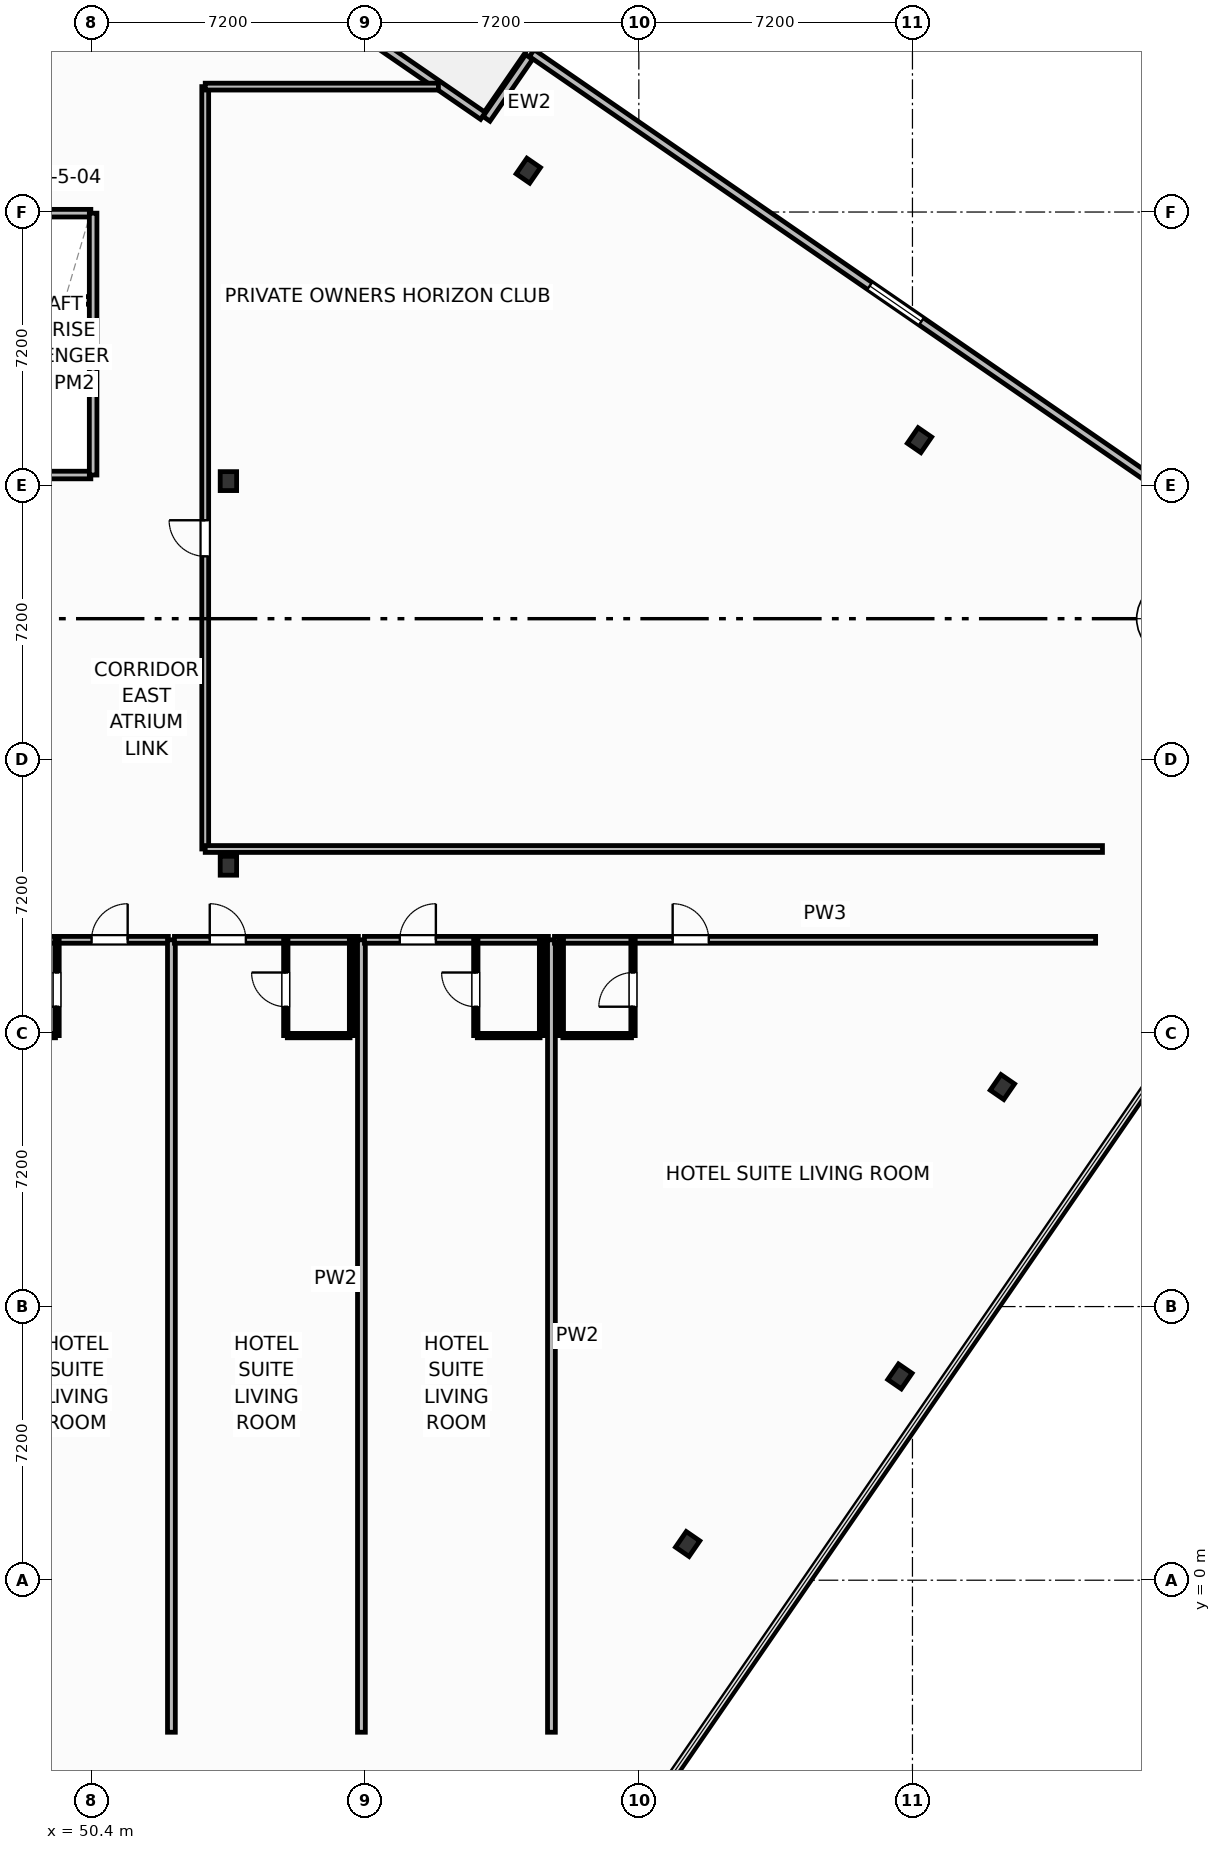
"""IFC4 building model, lengths in metres.
Left out: names, types, materials, properties, quantities, classifications, styles, units other than length and angle.
Written with IfcOpenShell. Run it as: python <this file> out.ifc"""

import sys

from ifc_helpers import new_model, si_unit, direction, frame, frame_2d, origin, origin_2d, place, context, subcontext, project, spatial, rectangle, i_section, extrude, element, fill, save


model = new_model("IFC4")
c1 = context("Model", 3, precision=1e-05, world=origin(), true_north=direction((0.0, 1.0)))
c2 = subcontext(c1, "Body", "Model", "MODEL_VIEW")
j1 = project(units=[si_unit("LENGTHUNIT", "METRE"), si_unit("PLANEANGLEUNIT", "RADIAN")], contexts=[c1])
p1 = place(None, origin())
s1 = spatial("IfcSite", under=j1, at=p1, CompositionType="ELEMENT")
p2 = place(p1, origin())
s2 = spatial("IfcBuilding", under=s1, at=p2, CompositionType="ELEMENT")
p3 = place(p2, frame((0.0, 0.0, 30.7)))
s3 = spatial("IfcBuildingStorey", under=s2, at=p3, CompositionType="ELEMENT", Elevation=30.7)
for number, where, z_axis, x_axis in (
    (1, (54.0, 18.8, 0.0), (0.0, 0.0, 1.0), (1.0, 0.0, 0.0)),
    (2, (54.0, 28.92, 0.0), (0.0, 0.0, 1.0), (1.0, 0.0, 0.0)),
    (3, (66.085, 0.953, 0.0), (0.0, 0.0, 1.0), (0.824, -0.567, 0.0)),
    (4, (71.67, 5.363, 0.0), (0.0, 0.0, 1.0), (0.824, -0.567, 0.0)),
    (5, (74.367, 12.976, 0.0), (0.0, 0.0, 1.0), (0.824, -0.567, 0.0)),
    (6, (72.186, 29.997, 0.0), (0.0, 0.0, 1.0), (0.824, -0.567, 0.0)),
    (7, (61.891, 37.088, 0.0), (0.0, 0.0, 1.0), (0.824, -0.567, 0.0)),
):
    element("IfcColumn", number, at=place(p3, frame(where, z_axis=z_axis, x_axis=x_axis)), inside=s3, PredefinedType="COLUMN", context=c2, shape_type="SweptSolid", body=[
        extrude(i_section(OverallWidth=0.432, OverallDepth=0.498, WebThickness=0.056, FlangeThickness=0.089, FilletRadius=0.025, at=origin_2d()), origin(), (0.0, 0.0, 1.0), 3.7),
    ])
p4 = place(p3, frame((55.757, 41.933, 0.0), z_axis=(0.0, 0.0, 1.0), x_axis=(0.823534636215, -0.567265989598, 0.0)))
e8 = element("IfcWall", 8, at=p4, inside=s3, PredefinedType="SOLIDWALL", context=c2, shape_type="SweptSolid", body=[
    extrude(rectangle(XDim=6.0, YDim=0.22, at=frame_2d((3.0, 0.0))), origin(), (0.0, 0.0, 1.0), 2.73),
])
p5 = place(p4, frame((0.4, 0.0, 0.0)))
e9 = element("IfcOpeningElement", 9, at=p5, cuts=e8, PredefinedType="OPENING", context=c2, shape_type="SweptSolid", body=[
    extrude(rectangle(XDim=1.5, YDim=2.25, at=frame_2d((0.75, 1.125))), frame((0.0, 0.12, 0.0), z_axis=(0.0, -1.0, 0.0), x_axis=(1.0, 0.0, 0.0)), (0.0, 0.0, 1.0), 0.24),
])
p6 = place(p3, frame((33.518, -1.362, 0.0), z_axis=(0.0, 0.0, 1.0), x_axis=(0.82353935489, -0.567259139148, 0.0)))
e10 = element("IfcWall", 10, at=p6, inside=s3, PredefinedType="SOLIDWALL", context=c2, shape_type="SweptSolid", body=[
    extrude(rectangle(XDim=23.147, YDim=0.22, at=frame_2d((11.573, 0.0))), origin(), (0.0, 0.0, 1.0), 2.73),
])
p7 = place(p6, frame((10.749, 0.0, 0.8)))
e11 = element("IfcOpeningElement", 11, at=p7, cuts=e10, PredefinedType="OPENING", context=c2, shape_type="SweptSolid", body=[
    extrude(rectangle(XDim=1.65, YDim=1.65, at=frame_2d((0.825, 0.825))), frame((0.0, 0.12, 0.0), z_axis=(0.0, -1.0, 0.0), x_axis=(1.0, 0.0, 0.0)), (0.0, 0.0, 1.0), 0.24),
])
p8 = place(p3, frame((81.127, 26.995, 0.0), z_axis=(0.0, 0.0, 1.0), x_axis=(-0.823530169317, 0.567272474411, 0.0)))
e12 = element("IfcWall", 12, at=p8, inside=s3, PredefinedType="SOLIDWALL", context=c2, shape_type="SweptSolid", body=[
    extrude(rectangle(XDim=23.247, YDim=0.22, at=frame_2d((11.624, 0.0))), origin(), (0.0, 0.0, 1.0), 2.73),
])
p9 = place(p8, frame((10.799, 0.0, 0.8)))
e13 = element("IfcOpeningElement", 13, at=p9, cuts=e12, PredefinedType="OPENING", context=c2, shape_type="SweptSolid", body=[
    extrude(rectangle(XDim=1.65, YDim=1.65, at=frame_2d((0.825, 0.825))), frame((0.0, 0.12, 0.0), z_axis=(0.0, -1.0, 0.0), x_axis=(1.0, 0.0, 0.0)), (0.0, 0.0, 1.0), 0.24),
])
p10 = place(p3, frame((61.912, 40.079, 0.0), z_axis=(0.0, 0.0, 1.0), x_axis=(-0.567189720735, -0.82358716642, 0.0)))
e14 = element("IfcWall", 14, at=p10, inside=s3, PredefinedType="SOLIDWALL", context=c2, shape_type="SweptSolid", body=[
    extrude(rectangle(XDim=1.975, YDim=0.22, at=frame_2d((0.987, 0.0))), origin(), (0.0, 0.0, 1.0), 2.73),
])
p11 = place(p3, frame((47.58, 16.85, 0.0), z_axis=(0.0, 0.0, 1.0), x_axis=(1.0, 0.0, 0.0)))
e15 = element("IfcWall", 15, at=p11, inside=s3, PredefinedType="PARTITIONING", context=c2, shape_type="SweptSolid", body=[
    extrude(rectangle(XDim=4.84, YDim=0.18, at=frame_2d((2.42, 0.0))), origin(), (0.0, 0.0, 1.0), 3.45),
])
p12 = place(p11, frame((2.819, 0.0, 0.0)))
e16 = element("IfcOpeningElement", 16, at=p12, cuts=e15, PredefinedType="OPENING", context=c2, shape_type="SweptSolid", body=[
    extrude(rectangle(XDim=0.95, YDim=2.15, at=frame_2d((0.475, 1.075))), frame((0.0, 0.1, 0.0), z_axis=(0.0, -1.0, 0.0), x_axis=(1.0, 0.0, 0.0)), (0.0, 0.0, 1.0), 0.2),
])
p13 = place(p3, frame((47.8, 14.33, 0.0), z_axis=(0.0, 0.0, 1.0), x_axis=(1.0, 0.0, 0.0)))
e17 = element("IfcWall", 17, at=p13, inside=s3, PredefinedType="PARTITIONING", context=c2, shape_type="SweptSolid", body=[
    extrude(rectangle(XDim=1.65, YDim=0.115, at=frame_2d((0.825, 0.0))), origin(), (0.0, 0.0, 1.0), 3.45),
])
p14 = place(p3, frame((49.49, 14.33, 0.0), z_axis=(0.0, 0.0, 1.0), x_axis=(0.0, 1.0, 0.0)))
e18 = element("IfcWall", 18, at=p14, inside=s3, PredefinedType="PARTITIONING", context=c2, shape_type="SweptSolid", body=[
    extrude(rectangle(XDim=2.52, YDim=0.115, at=frame_2d((1.26, 0.0))), origin(), (0.0, 0.0, 1.0), 3.45),
])
p15 = place(p14, frame((0.76, 0.0, 0.0)))
e19 = element("IfcOpeningElement", 19, at=p15, cuts=e18, PredefinedType="OPENING", context=c2, shape_type="SweptSolid", body=[
    extrude(rectangle(XDim=0.9, YDim=2.05, at=frame_2d((0.45, 1.025))), frame((0.0, 0.067, 0.0), z_axis=(0.0, -1.0, 0.0), x_axis=(1.0, 0.0, 0.0)), (0.0, 0.0, 1.0), 0.135),
])
p16 = place(p3, frame((52.5, -4.0, 0.0), z_axis=(0.0, 0.0, 1.0), x_axis=(0.0, 1.0, 0.0)))
e20 = element("IfcWall", 20, at=p16, inside=s3, PredefinedType="PARTITIONING", context=c2, shape_type="SweptSolid", body=[
    extrude(rectangle(XDim=20.85, YDim=0.205, at=frame_2d((10.425, 0.0))), origin(), (0.0, 0.0, 1.0), 3.45),
])
p17 = place(p3, frame((52.58, 16.85, 0.0), z_axis=(0.0, 0.0, 1.0), x_axis=(1.0, 0.0, 0.0)))
e21 = element("IfcWall", 21, at=p17, inside=s3, PredefinedType="PARTITIONING", context=c2, shape_type="SweptSolid", body=[
    extrude(rectangle(XDim=4.84, YDim=0.18, at=frame_2d((2.42, 0.0))), origin(), (0.0, 0.0, 1.0), 3.45),
])
p18 = place(p17, frame((0.929, 0.0, 0.0)))
e22 = element("IfcOpeningElement", 22, at=p18, cuts=e21, PredefinedType="OPENING", context=c2, shape_type="SweptSolid", body=[
    extrude(rectangle(XDim=0.95, YDim=2.15, at=frame_2d((0.475, 1.075))), frame((0.0, 0.1, 0.0), z_axis=(0.0, -1.0, 0.0), x_axis=(1.0, 0.0, 0.0)), (0.0, 0.0, 1.0), 0.2),
])
p19 = place(p3, frame((55.55, 14.33, 0.0), z_axis=(0.0, 0.0, 1.0), x_axis=(1.0, 0.0, 0.0)))
e23 = element("IfcWall", 23, at=p19, inside=s3, PredefinedType="PARTITIONING", context=c2, shape_type="SweptSolid", body=[
    extrude(rectangle(XDim=1.65, YDim=0.115, at=frame_2d((0.825, 0.0))), origin(), (0.0, 0.0, 1.0), 3.45),
])
p20 = place(p3, frame((55.51, 14.33, 0.0), z_axis=(0.0, 0.0, 1.0), x_axis=(0.0, 1.0, 0.0)))
e24 = element("IfcWall", 24, at=p20, inside=s3, PredefinedType="PARTITIONING", context=c2, shape_type="SweptSolid", body=[
    extrude(rectangle(XDim=2.52, YDim=0.115, at=frame_2d((1.26, 0.0))), origin(), (0.0, 0.0, 1.0), 3.45),
])
p21 = place(p20, frame((0.76, 0.0, 0.0)))
e25 = element("IfcOpeningElement", 25, at=p21, cuts=e24, PredefinedType="OPENING", context=c2, shape_type="SweptSolid", body=[
    extrude(rectangle(XDim=0.9, YDim=2.05, at=frame_2d((0.45, 1.025))), frame((0.0, 0.067, 0.0), z_axis=(0.0, -1.0, 0.0), x_axis=(1.0, 0.0, 0.0)), (0.0, 0.0, 1.0), 0.135),
])
p22 = place(p3, frame((57.24, 14.33, 0.0), z_axis=(0.0, 0.0, 1.0), x_axis=(0.0, 1.0, 0.0)))
e26 = element("IfcWall", 26, at=p22, inside=s3, PredefinedType="PARTITIONING", context=c2, shape_type="SweptSolid", body=[
    extrude(rectangle(XDim=2.52, YDim=0.115, at=frame_2d((1.26, 0.0))), origin(), (0.0, 0.0, 1.0), 3.45),
])
p23 = place(p3, frame((57.5, -4.0, 0.0), z_axis=(0.0, 0.0, 1.0), x_axis=(0.0, 1.0, 0.0)))
e27 = element("IfcWall", 27, at=p23, inside=s3, PredefinedType="PARTITIONING", context=c2, shape_type="SweptSolid", body=[
    extrude(rectangle(XDim=20.85, YDim=0.205, at=frame_2d((10.425, 0.0))), origin(), (0.0, 0.0, 1.0), 3.45),
])
p24 = place(p3, frame((57.58, 16.85, 0.0), z_axis=(0.0, 0.0, 1.0), x_axis=(1.0, 0.0, 0.0)))
e28 = element("IfcWall", 28, at=p24, inside=s3, PredefinedType="PARTITIONING", context=c2, shape_type="SweptSolid", body=[
    extrude(rectangle(XDim=4.84, YDim=0.18, at=frame_2d((2.42, 0.0))), origin(), (0.0, 0.0, 1.0), 2.58),
])
p25 = place(p24, frame((0.929, 0.0, 0.0)))
e29 = element("IfcOpeningElement", 29, at=p25, cuts=e28, PredefinedType="OPENING", context=c2, shape_type="SweptSolid", body=[
    extrude(rectangle(XDim=0.95, YDim=2.15, at=frame_2d((0.475, 1.075))), frame((0.0, 0.1, 0.0), z_axis=(0.0, -1.0, 0.0), x_axis=(1.0, 0.0, 0.0)), (0.0, 0.0, 1.0), 0.2),
])
p26 = place(p3, frame((60.55, 14.33, 0.0), z_axis=(0.0, 0.0, 1.0), x_axis=(1.0, 0.0, 0.0)))
e30 = element("IfcWall", 30, at=p26, inside=s3, PredefinedType="PARTITIONING", context=c2, shape_type="SweptSolid", body=[
    extrude(rectangle(XDim=1.65, YDim=0.115, at=frame_2d((0.825, 0.0))), origin(), (0.0, 0.0, 1.0), 3.45),
])
p27 = place(p3, frame((60.51, 14.33, 0.0), z_axis=(0.0, 0.0, 1.0), x_axis=(0.0, 1.0, 0.0)))
e31 = element("IfcWall", 31, at=p27, inside=s3, PredefinedType="PARTITIONING", context=c2, shape_type="SweptSolid", body=[
    extrude(rectangle(XDim=2.52, YDim=0.115, at=frame_2d((1.26, 0.0))), origin(), (0.0, 0.0, 1.0), 3.45),
])
p28 = place(p27, frame((0.76, 0.0, 0.0)))
e32 = element("IfcOpeningElement", 32, at=p28, cuts=e31, PredefinedType="OPENING", context=c2, shape_type="SweptSolid", body=[
    extrude(rectangle(XDim=0.9, YDim=2.05, at=frame_2d((0.45, 1.025))), frame((0.0, 0.067, 0.0), z_axis=(0.0, -1.0, 0.0), x_axis=(1.0, 0.0, 0.0)), (0.0, 0.0, 1.0), 0.135),
])
p29 = place(p3, frame((62.24, 14.33, 0.0), z_axis=(0.0, 0.0, 1.0), x_axis=(0.0, 1.0, 0.0)))
e33 = element("IfcWall", 33, at=p29, inside=s3, PredefinedType="PARTITIONING", context=c2, shape_type="SweptSolid", body=[
    extrude(rectangle(XDim=2.52, YDim=0.115, at=frame_2d((1.26, 0.0))), origin(), (0.0, 0.0, 1.0), 3.45),
])
p30 = place(p3, frame((62.5, -4.0, 0.0), z_axis=(0.0, 0.0, 1.0), x_axis=(0.0, 1.0, 0.0)))
e34 = element("IfcWall", 34, at=p30, inside=s3, PredefinedType="PARTITIONING", context=c2, shape_type="SweptSolid", body=[
    extrude(rectangle(XDim=20.85, YDim=0.205, at=frame_2d((10.425, 0.0))), origin(), (0.0, 0.0, 1.0), 3.45),
])
p31 = place(p3, frame((62.58, 16.85, 0.0), z_axis=(0.0, 0.0, 1.0), x_axis=(1.0, 0.0, 0.0)))
e35 = element("IfcWall", 35, at=p31, inside=s3, PredefinedType="PARTITIONING", context=c2, shape_type="SweptSolid", body=[
    extrude(rectangle(XDim=14.24, YDim=0.18, at=frame_2d((7.12, 0.0))), origin(), (0.0, 0.0, 1.0), 3.45),
])
p32 = place(p31, frame((3.11, 0.0, 0.0)))
e36 = element("IfcOpeningElement", 36, at=p32, cuts=e35, PredefinedType="OPENING", context=c2, shape_type="SweptSolid", body=[
    extrude(rectangle(XDim=0.95, YDim=2.15, at=frame_2d((0.475, 1.075))), frame((0.0, 0.1, 0.0), z_axis=(0.0, -1.0, 0.0), x_axis=(1.0, 0.0, 0.0)), (0.0, 0.0, 1.0), 0.2),
])
p33 = place(p3, frame((62.8, 14.33, 0.0), z_axis=(0.0, 0.0, 1.0), x_axis=(1.0, 0.0, 0.0)))
e37 = element("IfcWall", 37, at=p33, inside=s3, PredefinedType="PARTITIONING", context=c2, shape_type="SweptSolid", body=[
    extrude(rectangle(XDim=1.807, YDim=0.115, at=frame_2d((0.904, 0.0))), origin(), (0.0, 0.0, 1.0), 3.45),
])
p34 = place(p3, frame((64.647, 14.33, 0.0), z_axis=(0.0, 0.0, 1.0), x_axis=(0.0, 1.0, 0.0)))
e38 = element("IfcWall", 38, at=p34, inside=s3, PredefinedType="PARTITIONING", context=c2, shape_type="SweptSolid", body=[
    extrude(rectangle(XDim=2.52, YDim=0.115, at=frame_2d((1.26, 0.0))), origin(), (0.0, 0.0, 1.0), 3.45),
])
p35 = place(p34, frame((0.76, 0.0, 0.0)))
e39 = element("IfcOpeningElement", 39, at=p35, cuts=e38, PredefinedType="OPENING", context=c2, shape_type="SweptSolid", body=[
    extrude(rectangle(XDim=0.9, YDim=2.05, at=frame_2d((0.45, 1.025))), frame((0.0, 0.067, 0.0), z_axis=(0.0, -1.0, 0.0), x_axis=(1.0, 0.0, 0.0)), (0.0, 0.0, 1.0), 0.135),
])
p36 = place(p3, frame((62.76, 14.33, 0.0), z_axis=(0.0, 0.0, 1.0), x_axis=(0.0, 1.0, 0.0)))
e40 = element("IfcWall", 40, at=p36, inside=s3, PredefinedType="PARTITIONING", context=c2, shape_type="SweptSolid", body=[
    extrude(rectangle(XDim=2.52, YDim=0.115, at=frame_2d((1.26, 0.0))), origin(), (0.0, 0.0, 1.0), 3.45),
])
p37 = place(p3, frame((53.39, 19.24, 0.0), z_axis=(0.0, 0.0, 1.0), x_axis=(0.0, 1.0, 0.0)))
e41 = element("IfcWall", 41, at=p37, inside=s3, PredefinedType="PARTITIONING", context=c2, shape_type="SweptSolid", body=[
    extrude(rectangle(XDim=20.06, YDim=0.18, at=frame_2d((10.03, 0.0))), origin(), (0.0, 0.0, 1.0), 3.45),
])
p38 = place(p37, frame((7.7, 0.0, 0.0)))
e42 = element("IfcOpeningElement", 42, at=p38, cuts=e41, PredefinedType="OPENING", context=c2, shape_type="SweptSolid", body=[
    extrude(rectangle(XDim=0.95, YDim=2.05, at=frame_2d((0.475, 1.025))), frame((0.0, 0.1, 0.0), z_axis=(0.0, -1.0, 0.0), x_axis=(1.0, 0.0, 0.0)), (0.0, 0.0, 1.0), 0.2),
])
p39 = place(p3, frame((53.39, 19.24, 0.0), z_axis=(0.0, 0.0, 1.0), x_axis=(1.0, 0.0, 0.0)))
e43 = element("IfcWall", 43, at=p39, inside=s3, PredefinedType="PARTITIONING", context=c2, shape_type="SweptSolid", body=[
    extrude(rectangle(XDim=23.61, YDim=0.18, at=frame_2d((11.805, 0.0))), origin(), (0.0, 0.0, 1.0), 3.45),
])
p40 = place(p3, frame((53.39, 39.3, 0.0), z_axis=(0.0, 0.0, 1.0), x_axis=(1.0, 0.0, 0.0)))
e44 = element("IfcWall", 44, at=p40, inside=s3, PredefinedType="PARTITIONING", context=c2, shape_type="SweptSolid", body=[
    extrude(rectangle(XDim=6.136, YDim=0.18, at=frame_2d((3.068, 0.0))), origin(), (0.0, 0.0, 1.0), 3.45),
])
for number, where, z_axis, x_axis in (
    (45, (48.32, 31.375, 0.0), (0.0, 0.0, 1.0), (1.0, 0.0, 0.0)),
    (46, (48.32, 33.675, 0.0), (0.0, 0.0, 1.0), (1.0, 0.0, 0.0)),
):
    element("IfcWall", number, at=place(p3, frame(where, z_axis=z_axis, x_axis=x_axis)), inside=s3, PredefinedType="PARTITIONING", context=c2, shape_type="SweptSolid", body=[
        extrude(rectangle(XDim=2.06, YDim=0.2, at=frame_2d((1.03, 0.0))), origin(), (0.0, 0.0, 1.0), 3.45),
    ])
p41 = place(p3, frame((48.32, 29.08, 0.0), z_axis=(0.0, 0.0, 1.0), x_axis=(1.0, 0.0, 0.0)))
e47 = element("IfcWall", 47, at=p41, inside=s3, PredefinedType="PARTITIONING", context=c2, shape_type="SweptSolid", body=[
    extrude(rectangle(XDim=2.06, YDim=0.2, at=frame_2d((1.03, 0.0))), origin(), (0.0, 0.0, 1.0), 2.662),
])
p42 = place(p3, frame((48.32, 35.97, 0.0), z_axis=(0.0, 0.0, 1.0), x_axis=(1.0, 0.0, 0.0)))
e48 = element("IfcWall", 48, at=p42, inside=s3, PredefinedType="PARTITIONING", context=c2, shape_type="SweptSolid", body=[
    extrude(rectangle(XDim=2.06, YDim=0.2, at=frame_2d((1.03, 0.0))), origin(), (0.0, 0.0, 1.0), 3.45),
])
p43 = place(p3, frame((50.44, 29.08, 0.0), z_axis=(0.0, 0.0, 1.0), x_axis=(0.0, 1.0, 0.0)))
e49 = element("IfcWall", 49, at=p43, inside=s3, PredefinedType="PARTITIONING", context=c2, shape_type="SweptSolid", body=[
    extrude(rectangle(XDim=6.89, YDim=0.2, at=frame_2d((3.445, 0.0))), origin(), (0.0, 0.0, 1.0), 3.45),
])
p44 = place(p9, origin())
e50 = element("IfcWindow", 50, at=p44, inside=s3, PartitioningType="SINGLE_PANEL", PredefinedType="WINDOW", context=c2, shape_type="SweptSolid", body=[
    extrude(rectangle(XDim=1.65, YDim=1.65, at=frame_2d((0.825, 0.825))), frame((0.0, 0.03, 0.0), z_axis=(0.0, -1.0, 0.0), x_axis=(1.0, 0.0, 0.0)), (0.0, 0.0, 1.0), 0.06),
])
fill(e13, e50)
p45 = place(p12, origin())
e51 = element("IfcDoor", 51, at=p45, inside=s3, OperationType="SINGLE_SWING_RIGHT", PredefinedType="DOOR", context=c2, shape_type="SweptSolid", body=[
    extrude(rectangle(XDim=0.95, YDim=2.15, at=frame_2d((0.475, 1.075))), frame((0.0, 0.025, 0.0), z_axis=(0.0, -1.0, 0.0), x_axis=(1.0, 0.0, 0.0)), (0.0, 0.0, 1.0), 0.05),
])
fill(e16, e51)
p46 = place(p15, origin())
e52 = element("IfcDoor", 52, at=p46, inside=s3, OperationType="SINGLE_SWING_LEFT", PredefinedType="DOOR", context=c2, shape_type="SweptSolid", body=[
    extrude(rectangle(XDim=0.9, YDim=2.05, at=frame_2d((0.45, 1.025))), frame((0.0, 0.025, 0.0), z_axis=(0.0, -1.0, 0.0), x_axis=(1.0, 0.0, 0.0)), (0.0, 0.0, 1.0), 0.05),
])
fill(e19, e52)
p47 = place(p18, origin())
e53 = element("IfcDoor", 53, at=p47, inside=s3, OperationType="SINGLE_SWING_LEFT", PredefinedType="DOOR", context=c2, shape_type="SweptSolid", body=[
    extrude(rectangle(XDim=0.95, YDim=2.15, at=frame_2d((0.475, 1.075))), frame((0.0, 0.025, 0.0), z_axis=(0.0, -1.0, 0.0), x_axis=(1.0, 0.0, 0.0)), (0.0, 0.0, 1.0), 0.05),
])
fill(e22, e53)
p48 = place(p21, origin())
e54 = element("IfcDoor", 54, at=p48, inside=s3, OperationType="SINGLE_SWING_RIGHT", PredefinedType="DOOR", context=c2, shape_type="SweptSolid", body=[
    extrude(rectangle(XDim=0.9, YDim=2.05, at=frame_2d((0.45, 1.025))), frame((0.0, 0.025, 0.0), z_axis=(0.0, -1.0, 0.0), x_axis=(1.0, 0.0, 0.0)), (0.0, 0.0, 1.0), 0.05),
])
fill(e25, e54)
p49 = place(p25, origin())
e55 = element("IfcDoor", 55, at=p49, inside=s3, OperationType="SINGLE_SWING_RIGHT", PredefinedType="DOOR", context=c2, shape_type="SweptSolid", body=[
    extrude(rectangle(XDim=0.95, YDim=2.15, at=frame_2d((0.475, 1.075))), frame((0.0, 0.025, 0.0), z_axis=(0.0, -1.0, 0.0), x_axis=(1.0, 0.0, 0.0)), (0.0, 0.0, 1.0), 0.05),
])
fill(e29, e55)
p50 = place(p28, origin())
e56 = element("IfcDoor", 56, at=p50, inside=s3, OperationType="SINGLE_SWING_RIGHT", PredefinedType="DOOR", context=c2, shape_type="SweptSolid", body=[
    extrude(rectangle(XDim=0.9, YDim=2.05, at=frame_2d((0.45, 1.025))), frame((0.0, 0.025, 0.0), z_axis=(0.0, -1.0, 0.0), x_axis=(1.0, 0.0, 0.0)), (0.0, 0.0, 1.0), 0.05),
])
fill(e32, e56)
p51 = place(p32, origin())
e57 = element("IfcDoor", 57, at=p51, inside=s3, OperationType="SINGLE_SWING_LEFT", PredefinedType="DOOR", context=c2, shape_type="SweptSolid", body=[
    extrude(rectangle(XDim=0.95, YDim=2.15, at=frame_2d((0.475, 1.075))), frame((0.0, 0.025, 0.0), z_axis=(0.0, -1.0, 0.0), x_axis=(1.0, 0.0, 0.0)), (0.0, 0.0, 1.0), 0.05),
])
fill(e36, e57)
p52 = place(p35, origin())
e58 = element("IfcDoor", 58, at=p52, inside=s3, OperationType="SINGLE_SWING_LEFT", PredefinedType="DOOR", context=c2, shape_type="SweptSolid", body=[
    extrude(rectangle(XDim=0.9, YDim=2.05, at=frame_2d((0.45, 1.025))), frame((0.0, 0.025, 0.0), z_axis=(0.0, -1.0, 0.0), x_axis=(1.0, 0.0, 0.0)), (0.0, 0.0, 1.0), 0.05),
])
fill(e39, e58)
p53 = place(p38, origin())
e59 = element("IfcDoor", 59, at=p53, inside=s3, OperationType="SINGLE_SWING_RIGHT", PredefinedType="DOOR", context=c2, shape_type="SweptSolid", body=[
    extrude(rectangle(XDim=0.95, YDim=2.05, at=frame_2d((0.475, 1.025))), frame((0.0, 0.025, 0.0), z_axis=(0.0, -1.0, 0.0), x_axis=(1.0, 0.0, 0.0)), (0.0, 0.0, 1.0), 0.05),
])
fill(e42, e59)
save(model, sys.argv[1])
